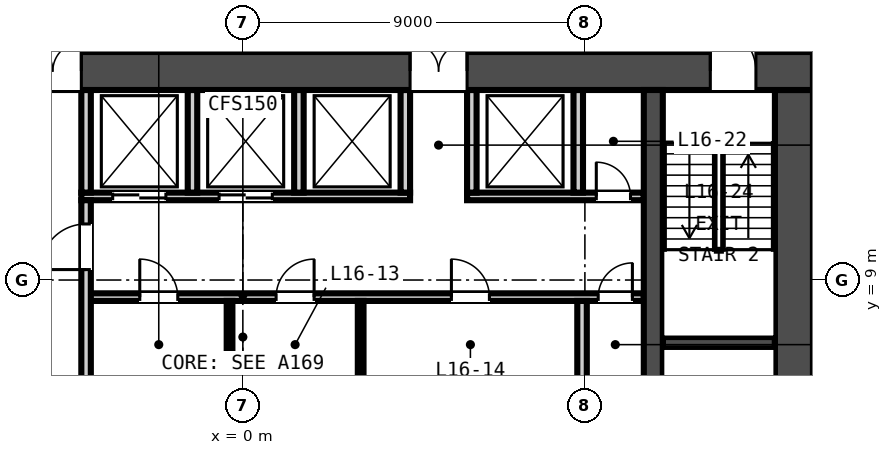
"""IFC4 building model, lengths in metres.
Left out: names, types, materials, properties, quantities, classifications, styles, units other than length and angle.
Written with IfcOpenShell. Run it as: python <this file> out.ifc"""

import sys

from ifc_helpers import new_model, si_unit, direction, frame, frame_2d, origin, place, context, subcontext, project, spatial, rectangle, extrude, element, fill, save


model = new_model("IFC4")
c1 = context("Model", 3, precision=1e-05, world=origin(), true_north=direction((0.0, 1.0)))
c2 = subcontext(c1, "Body", "Model", "MODEL_VIEW")
j1 = project(units=[si_unit("LENGTHUNIT", "METRE"), si_unit("PLANEANGLEUNIT", "RADIAN")], contexts=[c1])
p1 = place(None, origin())
s1 = spatial("IfcSite", under=j1, at=p1, CompositionType="ELEMENT")
p2 = place(p1, origin())
s2 = spatial("IfcBuilding", under=s1, at=p2, CompositionType="ELEMENT")
p3 = place(p2, frame((0.0, 0.0, 72.5)))
s3 = spatial("IfcBuildingStorey", under=s2, at=p3, CompositionType="ELEMENT", Elevation=72.5)
p4 = place(p3, frame((-15.0, 14.5, -0.15), z_axis=(0.0, 0.0, 1.0), x_axis=(1.0, 0.0, 0.0)))
e1 = element("IfcWall", 1, at=p4, inside=s3, PredefinedType="SOLIDWALL", context=c2, shape_type="SweptSolid", body=[
    extrude(rectangle(XDim=30.0, YDim=1.0, at=frame_2d((15.0, 0.0))), origin(), (0.0, 0.0, 1.0), 3.5),
])
p5 = place(p4, frame((9.25, 0.0, 0.15)))
e2 = element("IfcOpeningElement", 2, at=p5, cuts=e1, PredefinedType="OPENING", context=c2, shape_type="SweptSolid", body=[
    extrude(rectangle(XDim=1.5, YDim=2.1, at=frame_2d((0.75, 1.05))), frame((0.0, 0.51, 0.0), z_axis=(0.0, -1.0, 0.0), x_axis=(1.0, 0.0, 0.0)), (0.0, 0.0, 1.0), 1.02),
])
p6 = place(p4, frame((19.4, 0.0, 0.15)))
e3 = element("IfcOpeningElement", 3, at=p6, cuts=e1, PredefinedType="OPENING", context=c2, shape_type="SweptSolid", body=[
    extrude(rectangle(XDim=1.5, YDim=2.1, at=frame_2d((0.75, 1.05))), frame((0.0, 0.51, 0.0), z_axis=(0.0, -1.0, 0.0), x_axis=(1.0, 0.0, 0.0)), (0.0, 0.0, 1.0), 1.02),
])
p7 = place(p4, frame((1.5, 0.0, 0.15)))
e4 = element("IfcOpeningElement", 4, at=p7, cuts=e1, PredefinedType="OPENING", context=c2, shape_type="SweptSolid", body=[
    extrude(rectangle(XDim=1.2, YDim=2.1, at=frame_2d((0.6, 1.05))), frame((0.0, 0.51, 0.0), z_axis=(0.0, -1.0, 0.0), x_axis=(1.0, 0.0, 0.0)), (0.0, 0.0, 1.0), 1.02),
])
p8 = place(p4, frame((27.3, 0.0, 0.15)))
e5 = element("IfcOpeningElement", 5, at=p8, cuts=e1, PredefinedType="OPENING", context=c2, shape_type="SweptSolid", body=[
    extrude(rectangle(XDim=1.2, YDim=2.1, at=frame_2d((0.6, 1.05))), frame((0.0, 0.51, 0.0), z_axis=(0.0, -1.0, 0.0), x_axis=(1.0, 0.0, 0.0)), (0.0, 0.0, 1.0), 1.02),
])
p9 = place(p3, frame((14.5, 1.0, -0.15), z_axis=(0.0, 0.0, 1.0), x_axis=(0.0, 1.0, 0.0)))
e6 = element("IfcWall", 6, at=p9, inside=s3, PredefinedType="SOLIDWALL", context=c2, shape_type="SweptSolid", body=[
    extrude(rectangle(XDim=13.0, YDim=1.0, at=frame_2d((6.5, 0.0))), origin(), (0.0, 0.0, 1.0), 3.5),
])
p10 = place(p3, frame((10.8, 1.0, -0.15), z_axis=(0.0, 0.0, 1.0), x_axis=(0.0, 1.0, 0.0)))
e7 = element("IfcWall", 7, at=p10, inside=s3, PredefinedType="SOLIDWALL", context=c2, shape_type="SweptSolid", body=[
    extrude(rectangle(XDim=13.0, YDim=0.5, at=frame_2d((6.5, 0.0))), origin(), (0.0, 0.0, 1.0), 3.5),
])
p11 = place(p3, frame((-4.125, 8.55, 0.0), z_axis=(0.0, 0.0, 1.0), x_axis=(1.0, 0.0, 0.0)))
e8 = element("IfcWall", 8, at=p11, inside=s3, PredefinedType="PARTITIONING", context=c2, shape_type="SweptSolid", body=[
    extrude(rectangle(XDim=14.675, YDim=0.2, at=frame_2d((7.337, 0.0))), origin(), (0.0, 0.0, 1.0), 3.35),
])
p12 = place(p11, frame((1.413, 0.0, 0.0)))
e9 = element("IfcOpeningElement", 9, at=p12, cuts=e8, PredefinedType="OPENING", context=c2, shape_type="SweptSolid", body=[
    extrude(rectangle(XDim=1.0, YDim=2.1, at=frame_2d((0.5, 1.05))), frame((0.0, 0.11, 0.0), z_axis=(0.0, -1.0, 0.0), x_axis=(1.0, 0.0, 0.0)), (0.0, 0.0, 1.0), 0.22),
])
p13 = place(p11, frame((5.0, 0.0, 0.0)))
e10 = element("IfcOpeningElement", 10, at=p13, cuts=e8, PredefinedType="OPENING", context=c2, shape_type="SweptSolid", body=[
    extrude(rectangle(XDim=1.0, YDim=2.1, at=frame_2d((0.5, 1.05))), frame((0.0, 0.11, 0.0), z_axis=(0.0, -1.0, 0.0), x_axis=(1.0, 0.0, 0.0)), (0.0, 0.0, 1.0), 0.22),
])
p14 = place(p11, frame((9.613, 0.0, 0.0)))
e11 = element("IfcOpeningElement", 11, at=p14, cuts=e8, PredefinedType="OPENING", context=c2, shape_type="SweptSolid", body=[
    extrude(rectangle(XDim=1.0, YDim=2.1, at=frame_2d((0.5, 1.05))), frame((0.0, 0.11, 0.0), z_axis=(0.0, -1.0, 0.0), x_axis=(1.0, 0.0, 0.0)), (0.0, 0.0, 1.0), 0.22),
])
p15 = place(p11, frame((13.475, 0.0, 0.0)))
e12 = element("IfcOpeningElement", 12, at=p15, cuts=e8, PredefinedType="OPENING", context=c2, shape_type="SweptSolid", body=[
    extrude(rectangle(XDim=0.9, YDim=2.1, at=frame_2d((0.45, 1.05))), frame((0.0, 0.11, 0.0), z_axis=(0.0, -1.0, 0.0), x_axis=(1.0, 0.0, 0.0)), (0.0, 0.0, 1.0), 0.22),
])
p16 = place(p3, frame((-4.25, 11.2, 0.0), z_axis=(0.0, 0.0, 1.0), x_axis=(1.0, 0.0, 0.0)))
e13 = element("IfcWall", 13, at=p16, inside=s3, PredefinedType="PARTITIONING", context=c2, shape_type="SweptSolid", body=[
    extrude(rectangle(XDim=8.65, YDim=0.2, at=frame_2d((4.325, 0.0))), origin(), (0.0, 0.0, 1.0), 3.35),
])
p17 = place(p16, frame((0.825, 0.0, 0.0)))
e14 = element("IfcOpeningElement", 14, at=p17, cuts=e13, PredefinedType="OPENING", context=c2, shape_type="SweptSolid", body=[
    extrude(rectangle(XDim=1.4, YDim=2.1, at=frame_2d((0.7, 1.05))), frame((0.0, 0.11, 0.0), z_axis=(0.0, -1.0, 0.0), x_axis=(1.0, 0.0, 0.0)), (0.0, 0.0, 1.0), 0.22),
])
p18 = place(p16, frame((3.625, 0.0, 0.0)))
e15 = element("IfcOpeningElement", 15, at=p18, cuts=e13, PredefinedType="OPENING", context=c2, shape_type="SweptSolid", body=[
    extrude(rectangle(XDim=1.4, YDim=2.1, at=frame_2d((0.7, 1.05))), frame((0.0, 0.11, 0.0), z_axis=(0.0, -1.0, 0.0), x_axis=(1.0, 0.0, 0.0)), (0.0, 0.0, 1.0), 0.22),
])
p19 = place(p3, frame((5.9, 11.2, 0.0), z_axis=(0.0, 0.0, 1.0), x_axis=(1.0, 0.0, 0.0)))
e16 = element("IfcWall", 16, at=p19, inside=s3, PredefinedType="PARTITIONING", context=c2, shape_type="SweptSolid", body=[
    extrude(rectangle(XDim=4.65, YDim=0.2, at=frame_2d((2.325, 0.0))), origin(), (0.0, 0.0, 1.0), 3.35),
])
p20 = place(p19, frame((3.4, 0.0, 0.0)))
e17 = element("IfcOpeningElement", 17, at=p20, cuts=e16, PredefinedType="OPENING", context=c2, shape_type="SweptSolid", body=[
    extrude(rectangle(XDim=0.9, YDim=2.1, at=frame_2d((0.45, 1.05))), frame((0.0, 0.11, 0.0), z_axis=(0.0, -1.0, 0.0), x_axis=(1.0, 0.0, 0.0)), (0.0, 0.0, 1.0), 0.22),
])
p21 = place(p3, frame((-4.125, 6.15, 0.0), z_axis=(0.0, 0.0, 1.0), x_axis=(0.0, 1.0, 0.0)))
e18 = element("IfcWall", 18, at=p21, inside=s3, PredefinedType="PARTITIONING", context=c2, shape_type="SweptSolid", body=[
    extrude(rectangle(XDim=4.95, YDim=0.25, at=frame_2d((2.475, 0.0))), origin(), (0.0, 0.0, 1.0), 3.35),
])
p22 = place(p21, frame((3.125, 0.0, 0.0)))
e19 = element("IfcOpeningElement", 19, at=p22, cuts=e18, PredefinedType="OPENING", context=c2, shape_type="SweptSolid", body=[
    extrude(rectangle(XDim=1.2, YDim=2.1, at=frame_2d((0.6, 1.05))), frame((0.0, 0.135, 0.0), z_axis=(0.0, -1.0, 0.0), x_axis=(1.0, 0.0, 0.0)), (0.0, 0.0, 1.0), 0.27),
])
for number, where, z_axis, x_axis in (
    (20, (-0.35, 6.15, 0.0), (0.0, 0.0, 1.0), (0.0, 1.0, 0.0)),
    (21, (3.1, 6.15, 0.0), (0.0, 0.0, 1.0), (0.0, 1.0, 0.0)),
):
    element("IfcWall", number, at=place(p3, frame(where, z_axis=z_axis, x_axis=x_axis)), inside=s3, PredefinedType="PARTITIONING", context=c2, shape_type="SweptSolid", body=[
        extrude(rectangle(XDim=2.3, YDim=0.15, at=frame_2d((1.15, 0.0))), origin(), (0.0, 0.0, 1.0), 3.35),
    ])
p23 = place(p3, frame((8.925, 6.15, 0.0), z_axis=(0.0, 0.0, 1.0), x_axis=(0.0, 1.0, 0.0)))
e22 = element("IfcWall", 22, at=p23, inside=s3, PredefinedType="PARTITIONING", context=c2, shape_type="SweptSolid", body=[
    extrude(rectangle(XDim=2.3, YDim=0.25, at=frame_2d((1.15, 0.0))), origin(), (0.0, 0.0, 1.0), 3.35),
])
for number, where, z_axis, x_axis in (
    (23, (-4.125, 11.3, 0.0), (0.0, 0.0, 1.0), (0.0, 1.0, 0.0)),
    (24, (-1.325, 11.3, 0.0), (0.0, 0.0, 1.0), (0.0, 1.0, 0.0)),
    (25, (1.475, 11.3, 0.0), (0.0, 0.0, 1.0), (0.0, 1.0, 0.0)),
    (26, (4.275, 11.3, 0.0), (0.0, 0.0, 1.0), (0.0, 1.0, 0.0)),
    (27, (6.025, 11.3, 0.0), (0.0, 0.0, 1.0), (0.0, 1.0, 0.0)),
    (28, (8.825, 11.3, 0.0), (0.0, 0.0, 1.0), (0.0, 1.0, 0.0)),
):
    element("IfcWall", number, at=place(p3, frame(where, z_axis=z_axis, x_axis=x_axis)), inside=s3, PredefinedType="PARTITIONING", context=c2, shape_type="SweptSolid", body=[
        extrude(rectangle(XDim=2.7, YDim=0.25, at=frame_2d((1.35, 0.0))), origin(), (0.0, 0.0, 1.0), 3.35),
    ])
p24 = place(p3, frame((11.05, 7.35, -0.15), z_axis=(0.0, 0.0, 1.0), x_axis=(1.0, 0.0, 0.0)))
e29 = element("IfcWall", 29, at=p24, inside=s3, PredefinedType="SOLIDWALL", context=c2, shape_type="SweptSolid", body=[
    extrude(rectangle(XDim=2.95, YDim=0.3, at=frame_2d((1.475, 0.0))), origin(), (0.0, 0.0, 1.0), 3.5),
])
p25 = place(p22, origin())
e30 = element("IfcDoor", 30, at=p25, inside=s3, OperationType="SINGLE_SWING_LEFT", PredefinedType="DOOR", context=c2, shape_type="SweptSolid", body=[
    extrude(rectangle(XDim=1.2, YDim=2.1, at=frame_2d((0.6, 1.05))), frame((0.0, 0.025, 0.0), z_axis=(0.0, -1.0, 0.0), x_axis=(1.0, 0.0, 0.0)), (0.0, 0.0, 1.0), 0.05),
])
fill(e19, e30)
p26 = place(p12, origin())
e31 = element("IfcDoor", 31, at=p26, inside=s3, OperationType="SINGLE_SWING_LEFT", PredefinedType="DOOR", context=c2, shape_type="SweptSolid", body=[
    extrude(rectangle(XDim=1.0, YDim=2.1, at=frame_2d((0.5, 1.05))), frame((0.0, 0.025, 0.0), z_axis=(0.0, -1.0, 0.0), x_axis=(1.0, 0.0, 0.0)), (0.0, 0.0, 1.0), 0.05),
])
fill(e9, e31)
p27 = place(p13, origin())
e32 = element("IfcDoor", 32, at=p27, inside=s3, OperationType="SINGLE_SWING_RIGHT", PredefinedType="DOOR", context=c2, shape_type="SweptSolid", body=[
    extrude(rectangle(XDim=1.0, YDim=2.1, at=frame_2d((0.5, 1.05))), frame((0.0, 0.025, 0.0), z_axis=(0.0, -1.0, 0.0), x_axis=(1.0, 0.0, 0.0)), (0.0, 0.0, 1.0), 0.05),
])
fill(e10, e32)
p28 = place(p14, origin())
e33 = element("IfcDoor", 33, at=p28, inside=s3, OperationType="SINGLE_SWING_LEFT", PredefinedType="DOOR", context=c2, shape_type="SweptSolid", body=[
    extrude(rectangle(XDim=1.0, YDim=2.1, at=frame_2d((0.5, 1.05))), frame((0.0, 0.025, 0.0), z_axis=(0.0, -1.0, 0.0), x_axis=(1.0, 0.0, 0.0)), (0.0, 0.0, 1.0), 0.05),
])
fill(e11, e33)
p29 = place(p15, origin())
e34 = element("IfcDoor", 34, at=p29, inside=s3, OperationType="SINGLE_SWING_RIGHT", PredefinedType="DOOR", context=c2, shape_type="SweptSolid", body=[
    extrude(rectangle(XDim=0.9, YDim=2.1, at=frame_2d((0.45, 1.05))), frame((0.0, 0.025, 0.0), z_axis=(0.0, -1.0, 0.0), x_axis=(1.0, 0.0, 0.0)), (0.0, 0.0, 1.0), 0.05),
])
fill(e12, e34)
p30 = place(p17, origin())
e35 = element("IfcDoor", 35, at=p30, inside=s3, OperationType="DOUBLE_DOOR_SLIDING", PredefinedType="DOOR", context=c2, shape_type="SweptSolid", body=[
    extrude(rectangle(XDim=1.4, YDim=2.1, at=frame_2d((0.7, 1.05))), frame((0.0, 0.025, 0.0), z_axis=(0.0, -1.0, 0.0), x_axis=(1.0, 0.0, 0.0)), (0.0, 0.0, 1.0), 0.05),
])
fill(e14, e35)
p31 = place(p18, origin())
e36 = element("IfcDoor", 36, at=p31, inside=s3, OperationType="DOUBLE_DOOR_SLIDING", PredefinedType="DOOR", context=c2, shape_type="SweptSolid", body=[
    extrude(rectangle(XDim=1.4, YDim=2.1, at=frame_2d((0.7, 1.05))), frame((0.0, 0.025, 0.0), z_axis=(0.0, -1.0, 0.0), x_axis=(1.0, 0.0, 0.0)), (0.0, 0.0, 1.0), 0.05),
])
fill(e15, e36)
p32 = place(p20, origin())
e37 = element("IfcDoor", 37, at=p32, inside=s3, OperationType="SINGLE_SWING_LEFT", PredefinedType="DOOR", context=c2, shape_type="SweptSolid", body=[
    extrude(rectangle(XDim=0.9, YDim=2.1, at=frame_2d((0.45, 1.05))), frame((0.0, 0.025, 0.0), z_axis=(0.0, -1.0, 0.0), x_axis=(1.0, 0.0, 0.0)), (0.0, 0.0, 1.0), 0.05),
])
fill(e17, e37)
p33 = place(p5, origin())
e38 = element("IfcDoor", 38, at=p33, inside=s3, OperationType="DOUBLE_DOOR_SINGLE_SWING", PredefinedType="DOOR", context=c2, shape_type="SweptSolid", body=[
    extrude(rectangle(XDim=1.5, YDim=2.1, at=frame_2d((0.75, 1.05))), frame((0.0, 0.025, 0.0), z_axis=(0.0, -1.0, 0.0), x_axis=(1.0, 0.0, 0.0)), (0.0, 0.0, 1.0), 0.05),
])
fill(e2, e38)
p34 = place(p6, origin())
e39 = element("IfcDoor", 39, at=p34, inside=s3, OperationType="DOUBLE_DOOR_SINGLE_SWING", PredefinedType="DOOR", context=c2, shape_type="SweptSolid", body=[
    extrude(rectangle(XDim=1.5, YDim=2.1, at=frame_2d((0.75, 1.05))), frame((0.0, 0.025, 0.0), z_axis=(0.0, -1.0, 0.0), x_axis=(1.0, 0.0, 0.0)), (0.0, 0.0, 1.0), 0.05),
])
fill(e3, e39)
p35 = place(p8, origin())
e40 = element("IfcDoor", 40, at=p35, inside=s3, OperationType="SINGLE_SWING_LEFT", PredefinedType="DOOR", context=c2, shape_type="SweptSolid", body=[
    extrude(rectangle(XDim=1.2, YDim=2.1, at=frame_2d((0.6, 1.05))), frame((0.0, 0.025, 0.0), z_axis=(0.0, -1.0, 0.0), x_axis=(1.0, 0.0, 0.0)), (0.0, 0.0, 1.0), 0.05),
])
fill(e5, e40)
save(model, sys.argv[1])
